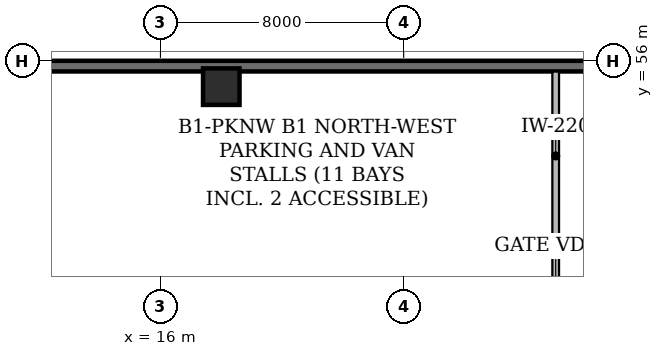
"""IFC4 building model, lengths in metres.
Left out: names, types, materials, properties, quantities, classifications, styles, units other than length and angle.
Written with IfcOpenShell. Run it as: python <this file> out.ifc"""

import sys

from ifc_helpers import new_model, si_unit, direction, frame, frame_2d, origin, origin_2d, place, context, subcontext, project, spatial, rectangle, hollow_rectangle, extrude, element, save


model = new_model("IFC4")
c1 = context("Model", 3, precision=1e-05, world=origin(), true_north=direction((0.0, 1.0)))
c2 = subcontext(c1, "Body", "Model", "MODEL_VIEW")
j1 = project(units=[si_unit("LENGTHUNIT", "METRE"), si_unit("PLANEANGLEUNIT", "RADIAN")], contexts=[c1])
p1 = place(None, origin())
s1 = spatial("IfcSite", under=j1, at=p1, CompositionType="ELEMENT")
p2 = place(p1, origin())
s2 = spatial("IfcBuilding", under=s1, at=p2, CompositionType="ELEMENT")
p3 = place(p2, frame((0.0, 0.0, -4.5)))
s3 = spatial("IfcBuildingStorey", under=s2, at=p3, CompositionType="ELEMENT", Elevation=-4.5)
p4 = place(p3, frame((18.0, 55.15, 0.0), z_axis=(0.0, 0.0, 1.0), x_axis=(1.0, 0.0, 0.0)))
e1 = element("IfcColumn", 1, at=p4, inside=s3, PredefinedType="COLUMN", context=c2, shape_type="SweptSolid", body=[
    extrude(hollow_rectangle(XDim=1.2, YDim=1.2, WallThickness=0.06, at=origin_2d()), origin(), (0.0, 0.0, 1.0), 4.5),
])
p5 = place(p3, frame((5.186, 55.825, 0.0), z_axis=(0.0, 0.0, 1.0), x_axis=(1.0, 0.0, 0.0)))
e2 = element("IfcWall", 2, at=p5, inside=s3, PredefinedType="USERDEFINED", context=c2, shape_type="SweptSolid", body=[
    extrude(rectangle(XDim=45.742, YDim=0.35, at=frame_2d((22.871, 0.0))), origin(), (0.0, 0.0, 1.0), 4.14),
])
p6 = place(p3, frame((29.0, 37.154, 0.0), z_axis=(0.0, 0.0, 1.0), x_axis=(0.0, 1.0, 0.0)))
e3 = element("IfcWall", 3, at=p6, inside=s3, PredefinedType="STANDARD", context=c2, shape_type="SweptSolid", body=[
    extrude(rectangle(XDim=18.492, YDim=0.22, at=frame_2d((9.246, 0.0))), origin(), (0.0, 0.0, 1.0), 4.14),
])
p7 = place(p6, frame((7.65, 0.0, 0.0)))
e4 = element("IfcOpeningElement", 4, at=p7, cuts=e3, PredefinedType="OPENING", context=c2, shape_type="SweptSolid", body=[
    extrude(rectangle(XDim=3.2, YDim=2.7, at=frame_2d((1.6, 1.35))), frame((0.0, 0.12, 0.0), z_axis=(0.0, -1.0, 0.0), x_axis=(1.0, 0.0, 0.0)), (0.0, 0.0, 1.0), 0.24),
])
save(model, sys.argv[1])
